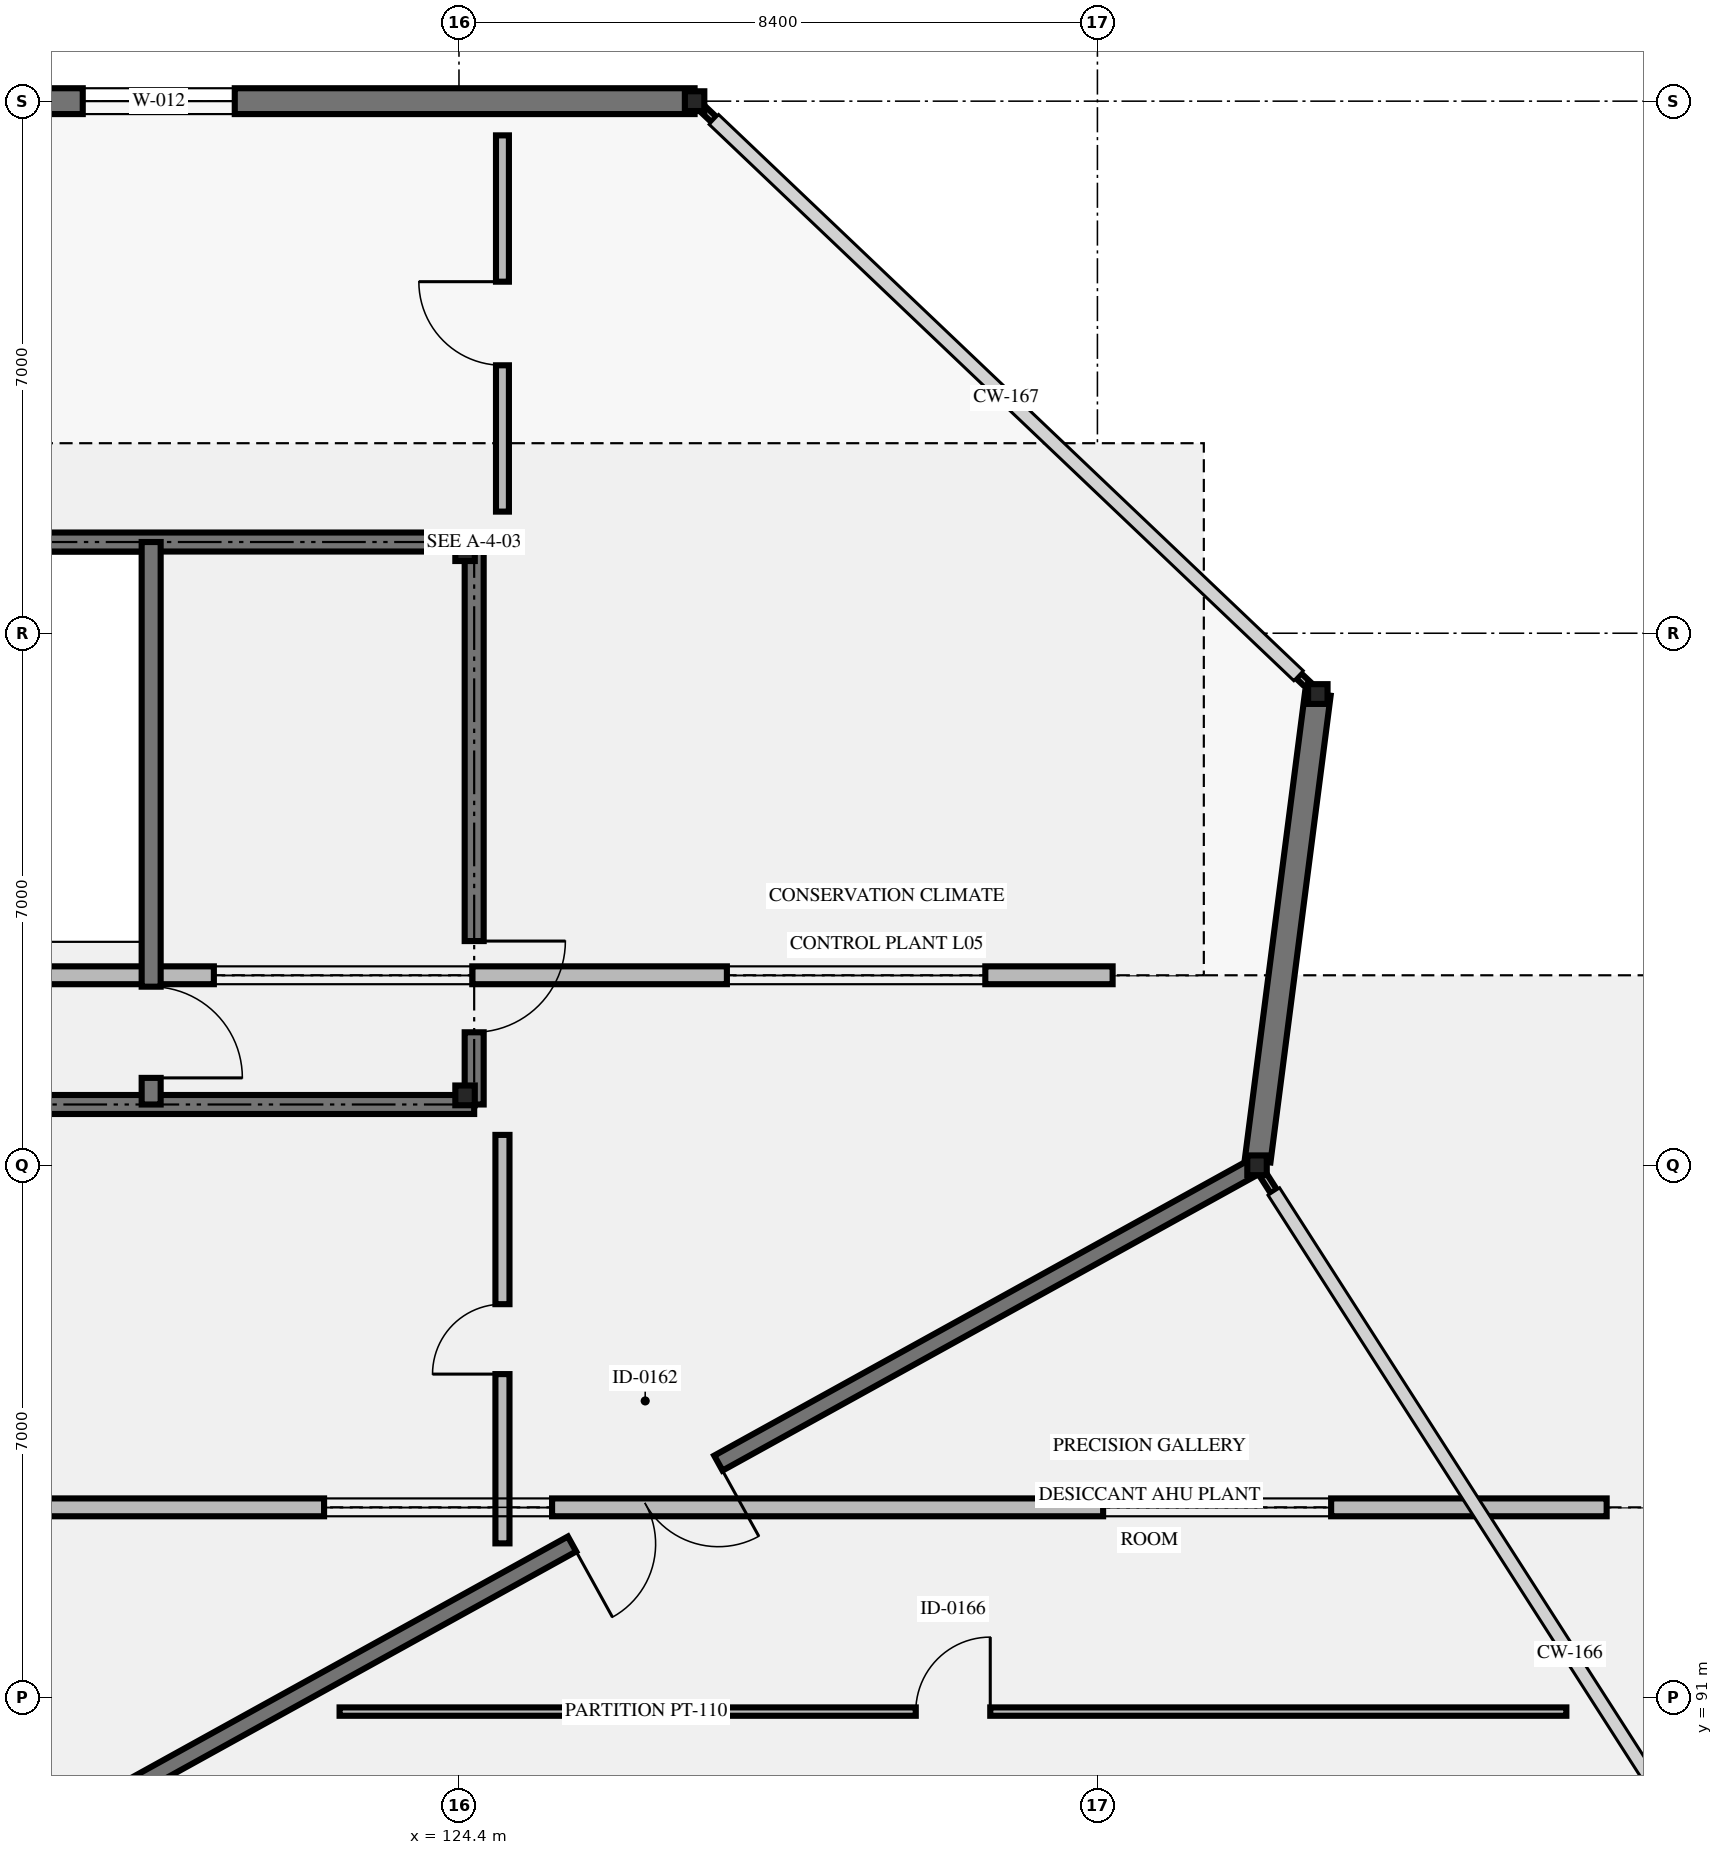
"""IFC4 building model, lengths in metres.
Left out: names, types, materials, properties, quantities, classifications, styles, units other than length and angle.
Written with IfcOpenShell. Run it as: python <this file> out.ifc"""

import sys

from ifc_helpers import new_model, si_unit, direction, frame, frame_2d, origin, origin_2d, place, context, subcontext, project, spatial, rectangle, i_section, extrude, element, fill, save


model = new_model("IFC4")
c1 = context("Model", 3, precision=1e-05, world=origin(), true_north=direction((0.0, 1.0)))
c2 = subcontext(c1, "Body", "Model", "MODEL_VIEW")
j1 = project(units=[si_unit("LENGTHUNIT", "METRE"), si_unit("PLANEANGLEUNIT", "RADIAN")], contexts=[c1])
p1 = place(None, origin())
s1 = spatial("IfcSite", under=j1, at=p1, CompositionType="ELEMENT")
p2 = place(p1, origin())
s2 = spatial("IfcBuilding", under=s1, at=p2, CompositionType="ELEMENT")
p3 = place(p2, frame((0.0, 0.0, 28.8)))
s3 = spatial("IfcBuildingStorey", under=s2, at=p3, CompositionType="ELEMENT", Elevation=28.8)
for number, where, z_axis, x_axis in (
    (1, (127.5, 112.0, 0.0), (0.0, 0.0, 1.0), (1.0, 0.0, 0.0)),
    (2, (134.9, 98.0, 0.0), (0.0, 0.0, 1.0), (1.0, 0.0, 0.0)),
    (3, (135.7, 104.2, 0.0), (0.0, 0.0, 1.0), (1.0, 0.0, 0.0)),
    (4, (124.48, 98.92, 0.0), (0.0, 0.0, 1.0), (1.0, 0.0, 0.0)),
    (5, (124.48, 106.08, 0.0), (0.0, 0.0, 1.0), (1.0, 0.0, 0.0)),
):
    element("IfcColumn", number, at=place(p3, frame(where, z_axis=z_axis, x_axis=x_axis)), inside=s3, PredefinedType="COLUMN", context=c2, shape_type="SweptSolid", body=[
        extrude(i_section(OverallWidth=0.256, OverallDepth=0.26, WebThickness=0.01, FlangeThickness=0.017, FilletRadius=0.013, at=origin_2d()), origin(), (0.0, 0.0, 1.0), 6.6),
    ])
p4 = place(p3, frame((134.955, 97.915, 0.0), z_axis=(0.0, 0.0, 1.0), x_axis=(0.538155087301, -0.842845835258, 0.0)))
e6 = element("IfcWall", 6, at=p4, inside=s3, PredefinedType="SOLIDWALL", context=c2, shape_type="SweptSolid", body=[
    extrude(rectangle(XDim=0.309, YDim=0.095, at=frame_2d((0.154, 0.0))), origin(), (0.0, 0.0, 1.0), 5.42),
])
p5 = place(p3, frame((135.7, 104.2, 0.0), z_axis=(0.0, 0.0, 1.0), x_axis=(-0.127911284164, -0.99178561362, 0.0)))
e7 = element("IfcWall", 7, at=p5, inside=s3, PredefinedType="SOLIDWALL", context=c2, shape_type="SweptSolid", body=[
    extrude(rectangle(XDim=6.192, YDim=0.34, at=frame_2d((3.096, 0.0))), origin(), (0.0, 0.0, 1.0), 5.42),
])
for number, where, z_axis, x_axis in (
    (8, (127.53, 111.971, 0.0), (0.0, 0.0, 1.0), (0.726, -0.687, 0.0)),
    (9, (135.446, 104.441, 0.0), (0.0, 0.0, 1.0), (0.726, -0.687, 0.0)),
):
    element("IfcWall", number, at=place(p3, frame(where, z_axis=z_axis, x_axis=x_axis)), inside=s3, PredefinedType="SOLIDWALL", context=c2, shape_type="SweptSolid", body=[
        extrude(rectangle(XDim=0.308, YDim=0.095, at=frame_2d((0.154, 0.0))), origin(), (0.0, 0.0, 1.0), 5.42),
    ])
p6 = place(p3, frame((113.4, 112.0, 0.0), z_axis=(0.0, 0.0, 1.0), x_axis=(1.0, 0.0, 0.0)))
e10 = element("IfcWall", 10, at=p6, inside=s3, PredefinedType="SOLIDWALL", context=c2, shape_type="SweptSolid", body=[
    extrude(rectangle(XDim=14.1, YDim=0.34, at=frame_2d((7.05, 0.0))), origin(), (0.0, 0.0, 1.0), 5.42),
])
p7 = place(p6, frame((6.05, 0.0, 0.95)))
e11 = element("IfcOpeningElement", 11, at=p7, cuts=e10, PredefinedType="OPENING", context=c2, shape_type="SweptSolid", body=[
    extrude(rectangle(XDim=2.0, YDim=2.4, at=frame_2d((1.0, 1.2))), frame((0.0, 0.18, 0.0), z_axis=(0.0, -1.0, 0.0), x_axis=(1.0, 0.0, 0.0)), (0.0, 0.0, 1.0), 0.36),
])
p8 = place(p3, frame((139.5, 93.5, 6.25), z_axis=(0.0, 0.0, 1.0), x_axis=(-1.0, 0.0, 0.0)))
e12 = element("IfcWall", 12, at=p8, inside=s3, PredefinedType="SOLIDWALL", context=c2, shape_type="SweptSolid", body=[
    extrude(rectangle(XDim=41.0, YDim=0.235, at=frame_2d((20.5, 0.0))), origin(), (0.0, 0.0, 1.0), 3.73),
])
p9 = place(p8, frame((3.625, 0.0, 0.25)))
e13 = element("IfcOpeningElement", 13, at=p9, cuts=e12, PredefinedType="OPENING", context=c2, shape_type="SweptSolid", body=[
    extrude(rectangle(XDim=3.0, YDim=2.6, at=frame_2d((1.5, 1.3))), frame((0.0, 0.127, 0.0), z_axis=(0.0, -1.0, 0.0), x_axis=(1.0, 0.0, 0.0)), (0.0, 0.0, 1.0), 0.255),
])
p10 = place(p8, frame((13.875, 0.0, 0.25)))
e14 = element("IfcOpeningElement", 14, at=p10, cuts=e12, PredefinedType="OPENING", context=c2, shape_type="SweptSolid", body=[
    extrude(rectangle(XDim=3.0, YDim=2.6, at=frame_2d((1.5, 1.3))), frame((0.0, 0.127, 0.0), z_axis=(0.0, -1.0, 0.0), x_axis=(1.0, 0.0, 0.0)), (0.0, 0.0, 1.0), 0.255),
])
p11 = place(p8, frame((24.125, 0.0, 0.25)))
e15 = element("IfcOpeningElement", 15, at=p11, cuts=e12, PredefinedType="OPENING", context=c2, shape_type="SweptSolid", body=[
    extrude(rectangle(XDim=3.0, YDim=2.6, at=frame_2d((1.5, 1.3))), frame((0.0, 0.127, 0.0), z_axis=(0.0, -1.0, 0.0), x_axis=(1.0, 0.0, 0.0)), (0.0, 0.0, 1.0), 0.255),
])
p12 = place(p8, frame((34.375, 0.0, 0.25)))
e16 = element("IfcOpeningElement", 16, at=p12, cuts=e12, PredefinedType="OPENING", context=c2, shape_type="SweptSolid", body=[
    extrude(rectangle(XDim=3.0, YDim=2.6, at=frame_2d((1.5, 1.3))), frame((0.0, 0.127, 0.0), z_axis=(0.0, -1.0, 0.0), x_axis=(1.0, 0.0, 0.0)), (0.0, 0.0, 1.0), 0.255),
])
p13 = place(p3, frame((133.0, 100.5, 6.25), z_axis=(0.0, 0.0, 1.0), x_axis=(-1.0, 0.0, 0.0)))
e17 = element("IfcWall", 17, at=p13, inside=s3, PredefinedType="SOLIDWALL", context=c2, shape_type="SweptSolid", body=[
    extrude(rectangle(XDim=27.0, YDim=0.235, at=frame_2d((13.5, 0.0))), origin(), (0.0, 0.0, 1.0), 3.73),
])
p14 = place(p13, frame((1.675, 0.0, 0.25)))
e18 = element("IfcOpeningElement", 18, at=p14, cuts=e17, PredefinedType="OPENING", context=c2, shape_type="SweptSolid", body=[
    extrude(rectangle(XDim=3.4, YDim=2.6, at=frame_2d((1.7, 1.3))), frame((0.0, 0.127, 0.0), z_axis=(0.0, -1.0, 0.0), x_axis=(1.0, 0.0, 0.0)), (0.0, 0.0, 1.0), 0.255),
])
p15 = place(p13, frame((8.425, 0.0, 0.25)))
e19 = element("IfcOpeningElement", 19, at=p15, cuts=e17, PredefinedType="OPENING", context=c2, shape_type="SweptSolid", body=[
    extrude(rectangle(XDim=3.4, YDim=2.6, at=frame_2d((1.7, 1.3))), frame((0.0, 0.127, 0.0), z_axis=(0.0, -1.0, 0.0), x_axis=(1.0, 0.0, 0.0)), (0.0, 0.0, 1.0), 0.255),
])
p16 = place(p13, frame((15.175, 0.0, 0.25)))
e20 = element("IfcOpeningElement", 20, at=p16, cuts=e17, PredefinedType="OPENING", context=c2, shape_type="SweptSolid", body=[
    extrude(rectangle(XDim=3.4, YDim=2.6, at=frame_2d((1.7, 1.3))), frame((0.0, 0.127, 0.0), z_axis=(0.0, -1.0, 0.0), x_axis=(1.0, 0.0, 0.0)), (0.0, 0.0, 1.0), 0.255),
])
p17 = place(p13, frame((21.925, 0.0, 0.25)))
e21 = element("IfcOpeningElement", 21, at=p17, cuts=e17, PredefinedType="OPENING", context=c2, shape_type="SweptSolid", body=[
    extrude(rectangle(XDim=3.4, YDim=2.6, at=frame_2d((1.7, 1.3))), frame((0.0, 0.127, 0.0), z_axis=(0.0, -1.0, 0.0), x_axis=(1.0, 0.0, 0.0)), (0.0, 0.0, 1.0), 0.255),
])
p18 = place(p3, frame((134.9, 98.0, 0.0), z_axis=(0.0, 0.0, 1.0), x_axis=(-0.875181353329, -0.483794996652, 0.0)))
e22 = element("IfcWall", 22, at=p18, inside=s3, PredefinedType="SOLIDWALL", context=c2, shape_type="SweptSolid", body=[
    extrude(rectangle(XDim=18.396, YDim=0.225, at=frame_2d((9.198, 0.0))), origin(), (0.0, 0.0, 1.0), 5.82),
])
p19 = place(p18, frame((8.098, 0.0, 0.0)))
e23 = element("IfcOpeningElement", 23, at=p19, cuts=e22, PredefinedType="OPENING", context=c2, shape_type="SweptSolid", body=[
    extrude(rectangle(XDim=2.2, YDim=2.6, at=frame_2d((1.1, 1.3))), frame((0.0, 0.123, 0.0), z_axis=(0.0, -1.0, 0.0), x_axis=(1.0, 0.0, 0.0)), (0.0, 0.0, 1.0), 0.245),
])
p20 = place(p3, frame((122.829, 90.813, 0.0), z_axis=(0.0, 0.0, 1.0), x_axis=(1.0, 0.0, 0.0)))
e24 = element("IfcWall", 24, at=p20, inside=s3, PredefinedType="PARTITIONING", context=c2, shape_type="SweptSolid", body=[
    extrude(rectangle(XDim=16.141, YDim=0.11, at=frame_2d((8.07, 0.0))), origin(), (0.0, 0.0, 1.0), 5.12),
])
p21 = place(p20, frame((7.581, 0.0, 0.0)))
e25 = element("IfcOpeningElement", 25, at=p21, cuts=e24, PredefinedType="OPENING", context=c2, shape_type="SweptSolid", body=[
    extrude(rectangle(XDim=0.98, YDim=2.15, at=frame_2d((0.49, 1.075))), frame((0.0, 0.065, 0.0), z_axis=(0.0, -1.0, 0.0), x_axis=(1.0, 0.0, 0.0)), (0.0, 0.0, 1.0), 0.13),
])
p22 = place(p3, frame((124.972, 93.026, 0.0), z_axis=(0.0, 0.0, 1.0), x_axis=(0.0, 1.0, 0.0)))
e26 = element("IfcWall", 26, at=p22, inside=s3, PredefinedType="PARTITIONING", context=c2, shape_type="SweptSolid", body=[
    extrude(rectangle(XDim=5.374, YDim=0.185, at=frame_2d((2.687, 0.0))), origin(), (0.0, 0.0, 1.0), 5.12),
])
p23 = place(p22, frame((2.227, 0.0, 0.0)))
e27 = element("IfcOpeningElement", 27, at=p23, cuts=e26, PredefinedType="OPENING", context=c2, shape_type="SweptSolid", body=[
    extrude(rectangle(XDim=0.92, YDim=2.1, at=frame_2d((0.46, 1.05))), frame((0.0, 0.103, 0.0), z_axis=(0.0, -1.0, 0.0), x_axis=(1.0, 0.0, 0.0)), (0.0, 0.0, 1.0), 0.205),
])
p24 = place(p3, frame((124.972, 106.6, 0.0), z_axis=(0.0, 0.0, 1.0), x_axis=(0.0, 1.0, 0.0)))
e28 = element("IfcWall", 28, at=p24, inside=s3, PredefinedType="PARTITIONING", context=c2, shape_type="SweptSolid", body=[
    extrude(rectangle(XDim=4.95, YDim=0.17, at=frame_2d((2.475, 0.0))), origin(), (0.0, 0.0, 1.0), 5.12),
])
p25 = place(p24, frame((1.925, 0.0, 0.0)))
e29 = element("IfcOpeningElement", 29, at=p25, cuts=e28, PredefinedType="OPENING", context=c2, shape_type="SweptSolid", body=[
    extrude(rectangle(XDim=1.1, YDim=2.2, at=frame_2d((0.55, 1.1))), frame((0.0, 0.095, 0.0), z_axis=(0.0, -1.0, 0.0), x_axis=(1.0, 0.0, 0.0)), (0.0, 0.0, 1.0), 0.19),
])
for number, where, z_axis, x_axis in (
    (30, (115.4, 106.2, 0.0), (0.0, 0.0, 1.0), (1.0, 0.0, 0.0)),
    (31, (124.6, 98.8, 0.0), (0.0, 0.0, 1.0), (-1.0, 0.0, 0.0)),
):
    element("IfcWall", number, at=place(p3, frame(where, z_axis=z_axis, x_axis=x_axis)), inside=s3, PredefinedType="SHEAR", context=c2, shape_type="SweptSolid", body=[
        extrude(rectangle(XDim=9.2, YDim=0.25, at=frame_2d((4.6, 0.0))), origin(), (0.0, 0.0, 1.0), 6.36),
    ])
p26 = place(p3, frame((124.6, 106.2, 0.0), z_axis=(0.0, 0.0, 1.0), x_axis=(0.0, -1.0, 0.0)))
e32 = element("IfcWall", 32, at=p26, inside=s3, PredefinedType="SHEAR", context=c2, shape_type="SweptSolid", body=[
    extrude(rectangle(XDim=7.4, YDim=0.25, at=frame_2d((3.7, 0.0))), origin(), (0.0, 0.0, 1.0), 6.36),
])
p27 = place(p26, frame((5.25, 0.0, 0.0)))
e33 = element("IfcOpeningElement", 33, at=p27, cuts=e32, PredefinedType="OPENING", context=c2, shape_type="SweptSolid", body=[
    extrude(rectangle(XDim=1.2, YDim=2.2, at=frame_2d((0.6, 1.1))), frame((0.0, 0.135, 0.0), z_axis=(0.0, -1.0, 0.0), x_axis=(1.0, 0.0, 0.0)), (0.0, 0.0, 1.0), 0.27),
])
p28 = place(p3, frame((120.35, 106.2, 0.0), z_axis=(0.0, 0.0, 1.0), x_axis=(0.0, -1.0, 0.0)))
e34 = element("IfcWall", 34, at=p28, inside=s3, PredefinedType="SHEAR", context=c2, shape_type="SweptSolid", body=[
    extrude(rectangle(XDim=7.4, YDim=0.25, at=frame_2d((3.7, 0.0))), origin(), (0.0, 0.0, 1.0), 6.36),
])
p29 = place(p28, frame((5.85, 0.0, 0.0)))
e35 = element("IfcOpeningElement", 35, at=p29, cuts=e34, PredefinedType="OPENING", context=c2, shape_type="SweptSolid", body=[
    extrude(rectangle(XDim=1.2, YDim=2.2, at=frame_2d((0.6, 1.1))), frame((0.0, 0.135, 0.0), z_axis=(0.0, -1.0, 0.0), x_axis=(1.0, 0.0, 0.0)), (0.0, 0.0, 1.0), 0.27),
])
p30 = place(p7, origin())
e36 = element("IfcWindow", 36, at=p30, inside=s3, PartitioningType="SINGLE_PANEL", PredefinedType="WINDOW", context=c2, shape_type="SweptSolid", body=[
    extrude(rectangle(XDim=2.0, YDim=2.4, at=frame_2d((1.0, 1.2))), frame((0.0, 0.03, 0.0), z_axis=(0.0, -1.0, 0.0), x_axis=(1.0, 0.0, 0.0)), (0.0, 0.0, 1.0), 0.06),
])
fill(e11, e36)
p31 = place(p9, origin())
e37 = element("IfcWindow", 37, at=p31, inside=s3, PartitioningType="SINGLE_PANEL", PredefinedType="SKYLIGHT", context=c2, shape_type="SweptSolid", body=[
    extrude(rectangle(XDim=3.0, YDim=2.6, at=frame_2d((1.5, 1.3))), frame((0.0, 0.03, 0.0), z_axis=(0.0, -1.0, 0.0), x_axis=(1.0, 0.0, 0.0)), (0.0, 0.0, 1.0), 0.06),
])
fill(e13, e37)
p32 = place(p10, origin())
e38 = element("IfcWindow", 38, at=p32, inside=s3, PartitioningType="SINGLE_PANEL", PredefinedType="SKYLIGHT", context=c2, shape_type="SweptSolid", body=[
    extrude(rectangle(XDim=3.0, YDim=2.6, at=frame_2d((1.5, 1.3))), frame((0.0, 0.03, 0.0), z_axis=(0.0, -1.0, 0.0), x_axis=(1.0, 0.0, 0.0)), (0.0, 0.0, 1.0), 0.06),
])
fill(e14, e38)
p33 = place(p14, origin())
e39 = element("IfcWindow", 39, at=p33, inside=s3, PartitioningType="SINGLE_PANEL", PredefinedType="SKYLIGHT", context=c2, shape_type="SweptSolid", body=[
    extrude(rectangle(XDim=3.4, YDim=2.6, at=frame_2d((1.7, 1.3))), frame((0.0, 0.03, 0.0), z_axis=(0.0, -1.0, 0.0), x_axis=(1.0, 0.0, 0.0)), (0.0, 0.0, 1.0), 0.06),
])
fill(e18, e39)
p34 = place(p15, origin())
e40 = element("IfcWindow", 40, at=p34, inside=s3, PartitioningType="SINGLE_PANEL", PredefinedType="SKYLIGHT", context=c2, shape_type="SweptSolid", body=[
    extrude(rectangle(XDim=3.4, YDim=2.6, at=frame_2d((1.7, 1.3))), frame((0.0, 0.03, 0.0), z_axis=(0.0, -1.0, 0.0), x_axis=(1.0, 0.0, 0.0)), (0.0, 0.0, 1.0), 0.06),
])
fill(e19, e40)
p35 = place(p19, origin())
e41 = element("IfcDoor", 41, at=p35, inside=s3, OperationType="DOUBLE_DOOR_SINGLE_SWING", PredefinedType="DOOR", context=c2, shape_type="SweptSolid", body=[
    extrude(rectangle(XDim=2.2, YDim=2.6, at=frame_2d((1.1, 1.3))), frame((0.0, 0.025, 0.0), z_axis=(0.0, -1.0, 0.0), x_axis=(1.0, 0.0, 0.0)), (0.0, 0.0, 1.0), 0.05),
])
fill(e23, e41)
p36 = place(p21, origin())
e42 = element("IfcDoor", 42, at=p36, inside=s3, OperationType="SINGLE_SWING_RIGHT", PredefinedType="DOOR", context=c2, shape_type="SweptSolid", body=[
    extrude(rectangle(XDim=0.98, YDim=2.15, at=frame_2d((0.49, 1.075))), frame((0.0, 0.025, 0.0), z_axis=(0.0, -1.0, 0.0), x_axis=(1.0, 0.0, 0.0)), (0.0, 0.0, 1.0), 0.05),
])
fill(e25, e42)
p37 = place(p23, origin())
e43 = element("IfcDoor", 43, at=p37, inside=s3, OperationType="SINGLE_SWING_LEFT", PredefinedType="DOOR", context=c2, shape_type="SweptSolid", body=[
    extrude(rectangle(XDim=0.92, YDim=2.1, at=frame_2d((0.46, 1.05))), frame((0.0, 0.025, 0.0), z_axis=(0.0, -1.0, 0.0), x_axis=(1.0, 0.0, 0.0)), (0.0, 0.0, 1.0), 0.05),
])
fill(e27, e43)
p38 = place(p25, origin())
e44 = element("IfcDoor", 44, at=p38, inside=s3, OperationType="SINGLE_SWING_RIGHT", PredefinedType="DOOR", context=c2, shape_type="SweptSolid", body=[
    extrude(rectangle(XDim=1.1, YDim=2.2, at=frame_2d((0.55, 1.1))), frame((0.0, 0.025, 0.0), z_axis=(0.0, -1.0, 0.0), x_axis=(1.0, 0.0, 0.0)), (0.0, 0.0, 1.0), 0.05),
])
fill(e29, e44)
p39 = place(p27, origin())
e45 = element("IfcDoor", 45, at=p39, inside=s3, OperationType="SINGLE_SWING_LEFT", PredefinedType="DOOR", context=c2, shape_type="SweptSolid", body=[
    extrude(rectangle(XDim=1.2, YDim=2.2, at=frame_2d((0.6, 1.1))), frame((0.0, 0.025, 0.0), z_axis=(0.0, -1.0, 0.0), x_axis=(1.0, 0.0, 0.0)), (0.0, 0.0, 1.0), 0.05),
])
fill(e33, e45)
p40 = place(p29, origin())
e46 = element("IfcDoor", 46, at=p40, inside=s3, OperationType="SINGLE_SWING_RIGHT", PredefinedType="DOOR", context=c2, shape_type="SweptSolid", body=[
    extrude(rectangle(XDim=1.2, YDim=2.2, at=frame_2d((0.6, 1.1))), frame((0.0, 0.025, 0.0), z_axis=(0.0, -1.0, 0.0), x_axis=(1.0, 0.0, 0.0)), (0.0, 0.0, 1.0), 0.05),
])
fill(e35, e46)
save(model, sys.argv[1])
